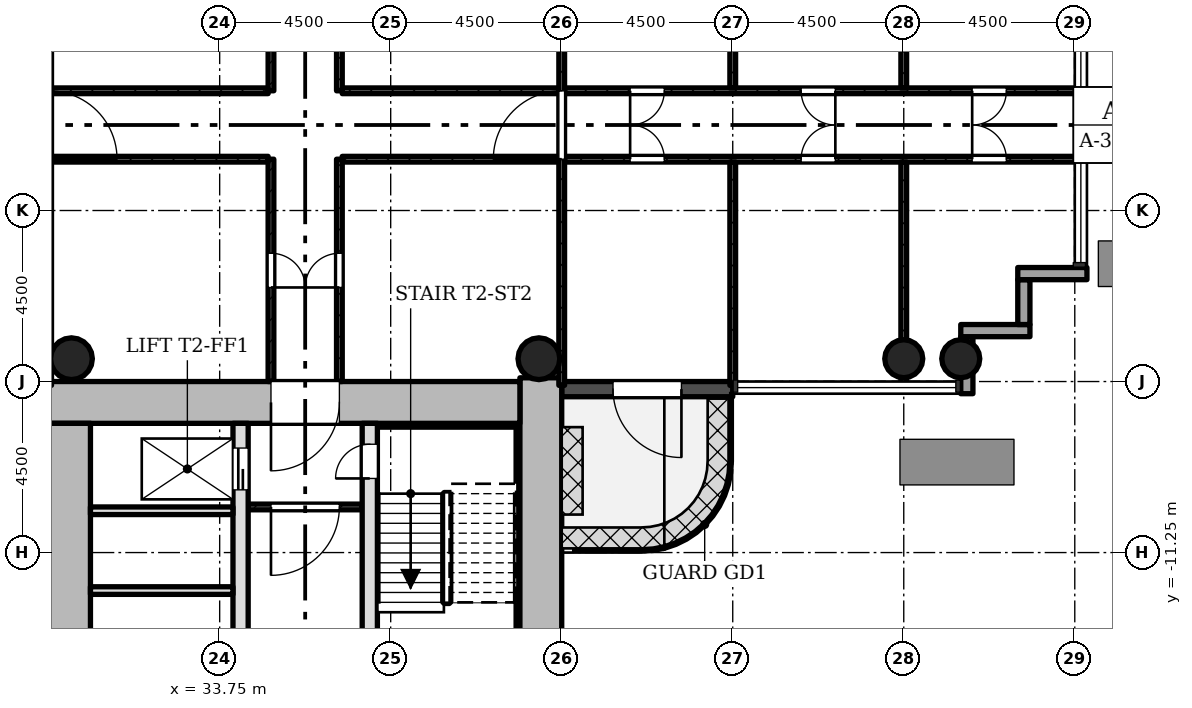
"""IFC4 building model, lengths in metres.
Left out: names, types, materials, properties, quantities, classifications, styles, units other than length and angle.
Written with IfcOpenShell. Run it as: python <this file> out.ifc"""

import sys

from ifc_helpers import new_model, si_unit, direction, frame, frame_2d, origin, origin_2d, place, context, subcontext, project, spatial, rectangle, hollow_circle, extrude, element, fill, save


model = new_model("IFC4")
c1 = context("Model", 3, precision=1e-05, world=origin(), true_north=direction((0.0, 1.0)))
c2 = subcontext(c1, "Body", "Model", "MODEL_VIEW")
j1 = project(units=[si_unit("LENGTHUNIT", "METRE"), si_unit("PLANEANGLEUNIT", "RADIAN")], contexts=[c1])
p1 = place(None, origin())
s1 = spatial("IfcSite", under=j1, at=p1, CompositionType="ELEMENT")
p2 = place(p1, origin())
s2 = spatial("IfcBuilding", under=s1, at=p2, CompositionType="ELEMENT")
p3 = place(p2, frame((0.0, 0.0, 72.1)))
s3 = spatial("IfcBuildingStorey", under=s2, at=p3, CompositionType="ELEMENT", Elevation=72.1)
p4 = place(p3, frame((42.2, -15.248, 0.0), z_axis=(0.0, 0.0, 1.0), x_axis=(0.0, 1.0, 0.0)))
e1 = element("IfcWall", 1, at=p4, inside=s3, PredefinedType="SHEAR", context=c2, shape_type="SweptSolid", body=[
    extrude(rectangle(XDim=8.596, YDim=1.1, at=frame_2d((4.298, 0.0))), origin(), (0.0, 0.0, 1.0), 4.5),
])
p5 = place(p3, frame((41.65, -7.3, 0.0), z_axis=(0.0, 0.0, 1.0), x_axis=(-1.0, 0.0, 0.0)))
e2 = element("IfcWall", 2, at=p5, inside=s3, PredefinedType="SHEAR", context=c2, shape_type="SweptSolid", body=[
    extrude(rectangle(XDim=12.4, YDim=1.1, at=frame_2d((6.2, 0.0))), origin(), (0.0, 0.0, 1.0), 4.5),
])
p6 = place(p5, frame((4.75, 0.0, 0.0)))
e3 = element("IfcOpeningElement", 3, at=p6, cuts=e2, PredefinedType="OPENING", context=c2, shape_type="SweptSolid", body=[
    extrude(rectangle(XDim=1.8, YDim=2.1, at=frame_2d((0.9, 1.05))), frame((0.0, 0.56, 0.0), z_axis=(0.0, -1.0, 0.0), x_axis=(1.0, 0.0, 0.0)), (0.0, 0.0, 1.0), 1.12),
])
p7 = place(p3, frame((29.8, -7.85, 0.0), z_axis=(0.0, 0.0, 1.0), x_axis=(0.0, -1.0, 0.0)))
e4 = element("IfcWall", 4, at=p7, inside=s3, PredefinedType="SHEAR", context=c2, shape_type="SweptSolid", body=[
    extrude(rectangle(XDim=7.9, YDim=1.1, at=frame_2d((3.95, 0.0))), origin(), (0.0, 0.0, 1.0), 4.5),
])
p8 = place(p3, frame((34.3, -14.65, 0.0), z_axis=(0.0, 0.0, 1.0), x_axis=(0.0, 1.0, 0.0)))
e5 = element("IfcWall", 5, at=p8, inside=s3, PredefinedType="SHEAR", context=c2, shape_type="SweptSolid", body=[
    extrude(rectangle(XDim=6.8, YDim=0.4, at=frame_2d((3.4, 0.0))), origin(), (0.0, 0.0, 1.0), 4.5),
])
p9 = place(p8, frame((5.05, 0.0, 0.0)))
e6 = element("IfcOpeningElement", 6, at=p9, cuts=e5, PredefinedType="OPENING", context=c2, shape_type="SweptSolid", body=[
    extrude(rectangle(XDim=1.1, YDim=2.1, at=frame_2d((0.55, 1.05))), frame((0.0, 0.21, 0.0), z_axis=(0.0, -1.0, 0.0), x_axis=(1.0, 0.0, 0.0)), (0.0, 0.0, 1.0), 0.42),
])
p10 = place(p3, frame((37.7, -14.65, 0.0), z_axis=(0.0, 0.0, 1.0), x_axis=(0.0, 1.0, 0.0)))
e7 = element("IfcWall", 7, at=p10, inside=s3, PredefinedType="SHEAR", context=c2, shape_type="SweptSolid", body=[
    extrude(rectangle(XDim=6.8, YDim=0.4, at=frame_2d((3.4, 0.0))), origin(), (0.0, 0.0, 1.0), 4.5),
])
p11 = place(p10, frame((5.35, 0.0, 0.0)))
e8 = element("IfcOpeningElement", 8, at=p11, cuts=e7, PredefinedType="OPENING", context=c2, shape_type="SweptSolid", body=[
    extrude(rectangle(XDim=0.9, YDim=2.1, at=frame_2d((0.45, 1.05))), frame((0.0, 0.21, 0.0), z_axis=(0.0, -1.0, 0.0), x_axis=(1.0, 0.0, 0.0)), (0.0, 0.0, 1.0), 0.42),
])
for number, where, z_axis, x_axis in (
    (9, (51.75, -6.15, 0.0), (0.0, 0.0, 1.0), (1.0, 0.0, 0.0)),
    (10, (53.25, -6.15, 0.0), (0.0, 0.0, 1.0), (1.0, 0.0, 0.0)),
):
    element("IfcColumn", number, at=place(p3, frame(where, z_axis=z_axis, x_axis=x_axis)), inside=s3, PredefinedType="COLUMN", context=c2, shape_type="SweptSolid", body=[
        extrude(hollow_circle(Radius=0.5, WallThickness=0.036, at=origin_2d()), origin(), (0.0, 0.0, 1.0), 4.5),
    ])
for number, where, z_axis, x_axis in (
    (11, (42.15, -6.15, 0.0), (0.0, 0.0, 1.0), (1.0, 0.0, 0.0)),
    (12, (29.85, -6.15, 0.0), (0.0, 0.0, 1.0), (1.0, 0.0, 0.0)),
):
    element("IfcColumn", number, at=place(p3, frame(where, z_axis=z_axis, x_axis=x_axis)), inside=s3, PredefinedType="COLUMN", context=c2, shape_type="SweptSolid", body=[
        extrude(hollow_circle(Radius=0.55, WallThickness=0.04, at=origin_2d()), origin(), (0.0, 0.0, 1.0), 4.5),
    ])
p12 = place(p3, frame((42.75, -6.95, -0.02), z_axis=(0.0, 0.0, 1.0), x_axis=(1.0, 0.0, 0.0)))
e13 = element("IfcWall", 13, at=p12, inside=s3, PredefinedType="STANDARD", context=c2, shape_type="SweptSolid", body=[
    extrude(rectangle(XDim=4.5, YDim=0.4, at=frame_2d((2.25, 0.0))), origin(), (0.0, 0.0, 1.0), 4.22),
])
p13 = place(p12, frame((1.35, 0.0, 0.02)))
e14 = element("IfcOpeningElement", 14, at=p13, cuts=e13, PredefinedType="OPENING", context=c2, shape_type="SweptSolid", body=[
    extrude(rectangle(XDim=1.8, YDim=2.1, at=frame_2d((0.9, 1.05))), frame((0.0, 0.21, 0.0), z_axis=(0.0, -1.0, 0.0), x_axis=(1.0, 0.0, 0.0)), (0.0, 0.0, 1.0), 0.42),
])
p14 = place(p3, frame((53.41, -7.07, -0.3), z_axis=(0.0, 0.0, 1.0), x_axis=(0.0, 1.0, 0.0)))
e15 = element("IfcWall", 15, at=p14, inside=s3, PredefinedType="STANDARD", context=c2, shape_type="SweptSolid", body=[
    extrude(rectangle(XDim=1.5, YDim=0.32, at=frame_2d((0.75, 0.0))), origin(), (0.0, 0.0, 1.0), 4.5),
])
p15 = place(p3, frame((53.25, -5.41, -0.3), z_axis=(0.0, 0.0, 1.0), x_axis=(1.0, 0.0, 0.0)))
e16 = element("IfcWall", 16, at=p15, inside=s3, PredefinedType="STANDARD", context=c2, shape_type="SweptSolid", body=[
    extrude(rectangle(XDim=1.82, YDim=0.32, at=frame_2d((0.91, 0.0))), origin(), (0.0, 0.0, 1.0), 4.5),
])
p16 = place(p3, frame((54.91, -5.25, -0.3), z_axis=(0.0, 0.0, 1.0), x_axis=(0.0, 1.0, 0.0)))
e17 = element("IfcWall", 17, at=p16, inside=s3, PredefinedType="STANDARD", context=c2, shape_type="SweptSolid", body=[
    extrude(rectangle(XDim=1.18, YDim=0.32, at=frame_2d((0.59, 0.0))), origin(), (0.0, 0.0, 1.0), 4.5),
])
p17 = place(p3, frame((54.75, -3.91, -0.3), z_axis=(0.0, 0.0, 1.0), x_axis=(1.0, 0.0, 0.0)))
e18 = element("IfcWall", 18, at=p17, inside=s3, PredefinedType="STANDARD", context=c2, shape_type="SweptSolid", body=[
    extrude(rectangle(XDim=1.82, YDim=0.32, at=frame_2d((0.91, 0.0))), origin(), (0.0, 0.0, 1.0), 4.5),
])
p18 = place(p3, frame((34.5, -10.05, 0.0), z_axis=(0.0, 0.0, 1.0), x_axis=(1.0, 0.0, 0.0)))
e19 = element("IfcWall", 19, at=p18, inside=s3, PredefinedType="PARTITIONING", context=c2, shape_type="SweptSolid", body=[
    extrude(rectangle(XDim=3.0, YDim=0.15, at=frame_2d((1.5, 0.0))), origin(), (0.0, 0.0, 1.0), 4.08),
])
p19 = place(p18, frame((0.6, 0.0, 0.0)))
e20 = element("IfcOpeningElement", 20, at=p19, cuts=e19, PredefinedType="OPENING", context=c2, shape_type="SweptSolid", body=[
    extrude(rectangle(XDim=1.8, YDim=2.1, at=frame_2d((0.9, 1.05))), frame((0.0, 0.085, 0.0), z_axis=(0.0, -1.0, 0.0), x_axis=(1.0, 0.0, 0.0)), (0.0, 0.0, 1.0), 0.17),
])
for number, where, z_axis, x_axis in (
    (21, (30.35, -10.15, 0.0), (0.0, 0.0, 1.0), (1.0, 0.0, 0.0)),
    (22, (30.35, -12.25, 0.0), (0.0, 0.0, 1.0), (1.0, 0.0, 0.0)),
):
    element("IfcWall", number, at=place(p3, frame(where, z_axis=z_axis, x_axis=x_axis)), inside=s3, PredefinedType="SOLIDWALL", context=c2, shape_type="SweptSolid", body=[
        extrude(rectangle(XDim=3.75, YDim=0.2, at=frame_2d((1.875, 0.0))), origin(), (0.0, 0.0, 1.0), 4.08),
    ])
p20 = place(p3, frame((35.1, 0.9, 0.0), z_axis=(0.0, 0.0, 1.0), x_axis=(0.0, 1.0, 0.0)))
e23 = element("IfcWall", 23, at=p20, inside=s3, PredefinedType="PARTITIONING", context=c2, shape_type="SweptSolid", body=[
    extrude(rectangle(XDim=5.85, YDim=0.15, at=frame_2d((2.925, 0.0))), origin(), (0.0, 0.0, 1.0), 4.08),
])
p21 = place(p20, frame((2.475, 0.0, 0.0)))
e24 = element("IfcOpeningElement", 24, at=p21, cuts=e23, PredefinedType="OPENING", context=c2, shape_type="SweptSolid", body=[
    extrude(rectangle(XDim=0.9, YDim=2.1, at=frame_2d((0.45, 1.05))), frame((0.0, 0.085, 0.0), z_axis=(0.0, -1.0, 0.0), x_axis=(1.0, 0.0, 0.0)), (0.0, 0.0, 1.0), 0.17),
])
p22 = place(p3, frame((35.025, 0.9, 0.0), z_axis=(0.0, 0.0, 1.0), x_axis=(-1.0, 0.0, 0.0)))
e25 = element("IfcWall", 25, at=p22, inside=s3, PredefinedType="PARTITIONING", context=c2, shape_type="SweptSolid", body=[
    extrude(rectangle(XDim=5.7, YDim=0.15, at=frame_2d((2.85, 0.0))), origin(), (0.0, 0.0, 1.0), 4.08),
])
p23 = place(p3, frame((36.9, 0.9, 0.0), z_axis=(0.0, 0.0, 1.0), x_axis=(0.0, 1.0, 0.0)))
e26 = element("IfcWall", 26, at=p23, inside=s3, PredefinedType="PARTITIONING", context=c2, shape_type="SweptSolid", body=[
    extrude(rectangle(XDim=5.85, YDim=0.15, at=frame_2d((2.925, 0.0))), origin(), (0.0, 0.0, 1.0), 4.08),
])
p24 = place(p23, frame((2.475, 0.0, 0.0)))
e27 = element("IfcOpeningElement", 27, at=p24, cuts=e26, PredefinedType="OPENING", context=c2, shape_type="SweptSolid", body=[
    extrude(rectangle(XDim=0.9, YDim=2.1, at=frame_2d((0.45, 1.05))), frame((0.0, 0.085, 0.0), z_axis=(0.0, -1.0, 0.0), x_axis=(1.0, 0.0, 0.0)), (0.0, 0.0, 1.0), 0.17),
])
p25 = place(p3, frame((42.675, 0.9, 0.0), z_axis=(0.0, 0.0, 1.0), x_axis=(-1.0, 0.0, 0.0)))
e28 = element("IfcWall", 28, at=p25, inside=s3, PredefinedType="PARTITIONING", context=c2, shape_type="SweptSolid", body=[
    extrude(rectangle(XDim=5.7, YDim=0.15, at=frame_2d((2.85, 0.0))), origin(), (0.0, 0.0, 1.0), 4.08),
])
p26 = place(p3, frame((35.1, -6.75, 0.0), z_axis=(0.0, 0.0, 1.0), x_axis=(0.0, 1.0, 0.0)))
e29 = element("IfcWall", 29, at=p26, inside=s3, PredefinedType="PARTITIONING", context=c2, shape_type="SweptSolid", body=[
    extrude(rectangle(XDim=5.85, YDim=0.15, at=frame_2d((2.925, 0.0))), origin(), (0.0, 0.0, 1.0), 4.08),
])
p27 = place(p26, frame((2.475, 0.0, 0.0)))
e30 = element("IfcOpeningElement", 30, at=p27, cuts=e29, PredefinedType="OPENING", context=c2, shape_type="SweptSolid", body=[
    extrude(rectangle(XDim=0.9, YDim=2.1, at=frame_2d((0.45, 1.05))), frame((0.0, 0.085, 0.0), z_axis=(0.0, -1.0, 0.0), x_axis=(1.0, 0.0, 0.0)), (0.0, 0.0, 1.0), 0.17),
])
p28 = place(p3, frame((35.025, -0.9, 0.0), z_axis=(0.0, 0.0, 1.0), x_axis=(-1.0, 0.0, 0.0)))
e31 = element("IfcWall", 31, at=p28, inside=s3, PredefinedType="PARTITIONING", context=c2, shape_type="SweptSolid", body=[
    extrude(rectangle(XDim=5.7, YDim=0.15, at=frame_2d((2.85, 0.0))), origin(), (0.0, 0.0, 1.0), 4.08),
])
p29 = place(p3, frame((36.9, -6.75, 0.0), z_axis=(0.0, 0.0, 1.0), x_axis=(0.0, 1.0, 0.0)))
e32 = element("IfcWall", 32, at=p29, inside=s3, PredefinedType="PARTITIONING", context=c2, shape_type="SweptSolid", body=[
    extrude(rectangle(XDim=5.85, YDim=0.15, at=frame_2d((2.925, 0.0))), origin(), (0.0, 0.0, 1.0), 4.08),
])
p30 = place(p29, frame((2.475, 0.0, 0.0)))
e33 = element("IfcOpeningElement", 33, at=p30, cuts=e32, PredefinedType="OPENING", context=c2, shape_type="SweptSolid", body=[
    extrude(rectangle(XDim=0.9, YDim=2.1, at=frame_2d((0.45, 1.05))), frame((0.0, 0.085, 0.0), z_axis=(0.0, -1.0, 0.0), x_axis=(1.0, 0.0, 0.0)), (0.0, 0.0, 1.0), 0.17),
])
p31 = place(p3, frame((42.675, -0.9, 0.0), z_axis=(0.0, 0.0, 1.0), x_axis=(-1.0, 0.0, 0.0)))
e34 = element("IfcWall", 34, at=p31, inside=s3, PredefinedType="PARTITIONING", context=c2, shape_type="SweptSolid", body=[
    extrude(rectangle(XDim=5.7, YDim=0.15, at=frame_2d((2.85, 0.0))), origin(), (0.0, 0.0, 1.0), 4.08),
])
p32 = place(p3, frame((42.75, -6.85, 0.0), z_axis=(0.0, 0.0, 1.0), x_axis=(0.0, 1.0, 0.0)))
e35 = element("IfcWall", 35, at=p32, inside=s3, PredefinedType="PARTITIONING", context=c2, shape_type="SweptSolid", body=[
    extrude(rectangle(XDim=13.7, YDim=0.15, at=frame_2d((6.85, 0.0))), origin(), (0.0, 0.0, 1.0), 4.08),
])
p33 = place(p32, frame((5.95, 0.0, 0.0)))
e36 = element("IfcOpeningElement", 36, at=p33, cuts=e35, PredefinedType="OPENING", context=c2, shape_type="SweptSolid", body=[
    extrude(rectangle(XDim=1.8, YDim=2.1, at=frame_2d((0.9, 1.05))), frame((0.0, 0.085, 0.0), z_axis=(0.0, -1.0, 0.0), x_axis=(1.0, 0.0, 0.0)), (0.0, 0.0, 1.0), 0.17),
])
p34 = place(p3, frame((56.35, 0.9, 0.0), z_axis=(0.0, 0.0, 1.0), x_axis=(-1.0, 0.0, 0.0)))
e37 = element("IfcWall", 37, at=p34, inside=s3, PredefinedType="PARTITIONING", context=c2, shape_type="SweptSolid", body=[
    extrude(rectangle(XDim=13.525, YDim=0.15, at=frame_2d((6.763, 0.0))), origin(), (0.0, 0.0, 1.0), 4.08),
])
p35 = place(p34, frame((1.9, 0.0, 0.0)))
e38 = element("IfcOpeningElement", 38, at=p35, cuts=e37, PredefinedType="OPENING", context=c2, shape_type="SweptSolid", body=[
    extrude(rectangle(XDim=0.9, YDim=2.1, at=frame_2d((0.45, 1.05))), frame((0.0, 0.085, 0.0), z_axis=(0.0, -1.0, 0.0), x_axis=(1.0, 0.0, 0.0)), (0.0, 0.0, 1.0), 0.17),
])
p36 = place(p34, frame((6.4, 0.0, 0.0)))
e39 = element("IfcOpeningElement", 39, at=p36, cuts=e37, PredefinedType="OPENING", context=c2, shape_type="SweptSolid", body=[
    extrude(rectangle(XDim=0.9, YDim=2.1, at=frame_2d((0.45, 1.05))), frame((0.0, 0.085, 0.0), z_axis=(0.0, -1.0, 0.0), x_axis=(1.0, 0.0, 0.0)), (0.0, 0.0, 1.0), 0.17),
])
p37 = place(p34, frame((10.9, 0.0, 0.0)))
e40 = element("IfcOpeningElement", 40, at=p37, cuts=e37, PredefinedType="OPENING", context=c2, shape_type="SweptSolid", body=[
    extrude(rectangle(XDim=0.9, YDim=2.1, at=frame_2d((0.45, 1.05))), frame((0.0, 0.085, 0.0), z_axis=(0.0, -1.0, 0.0), x_axis=(1.0, 0.0, 0.0)), (0.0, 0.0, 1.0), 0.17),
])
for number, where, z_axis, x_axis in (
    (41, (51.75, 0.975, 0.0), (0.0, 0.0, 1.0), (0.0, 1.0, 0.0)),
    (42, (47.25, 0.975, 0.0), (0.0, 0.0, 1.0), (0.0, 1.0, 0.0)),
):
    element("IfcWall", number, at=place(p3, frame(where, z_axis=z_axis, x_axis=x_axis)), inside=s3, PredefinedType="PARTITIONING", context=c2, shape_type="SweptSolid", body=[
        extrude(rectangle(XDim=5.875, YDim=0.15, at=frame_2d((2.938, 0.0))), origin(), (0.0, 0.0, 1.0), 4.08),
    ])
p38 = place(p3, frame((56.35, -0.9, 0.0), z_axis=(0.0, 0.0, 1.0), x_axis=(-1.0, 0.0, 0.0)))
e43 = element("IfcWall", 43, at=p38, inside=s3, PredefinedType="PARTITIONING", context=c2, shape_type="SweptSolid", body=[
    extrude(rectangle(XDim=13.525, YDim=0.15, at=frame_2d((6.763, 0.0))), origin(), (0.0, 0.0, 1.0), 4.08),
])
p39 = place(p38, frame((1.9, 0.0, 0.0)))
e44 = element("IfcOpeningElement", 44, at=p39, cuts=e43, PredefinedType="OPENING", context=c2, shape_type="SweptSolid", body=[
    extrude(rectangle(XDim=0.9, YDim=2.1, at=frame_2d((0.45, 1.05))), frame((0.0, 0.085, 0.0), z_axis=(0.0, -1.0, 0.0), x_axis=(1.0, 0.0, 0.0)), (0.0, 0.0, 1.0), 0.17),
])
p40 = place(p38, frame((6.4, 0.0, 0.0)))
e45 = element("IfcOpeningElement", 45, at=p40, cuts=e43, PredefinedType="OPENING", context=c2, shape_type="SweptSolid", body=[
    extrude(rectangle(XDim=0.9, YDim=2.1, at=frame_2d((0.45, 1.05))), frame((0.0, 0.085, 0.0), z_axis=(0.0, -1.0, 0.0), x_axis=(1.0, 0.0, 0.0)), (0.0, 0.0, 1.0), 0.17),
])
p41 = place(p38, frame((10.9, 0.0, 0.0)))
e46 = element("IfcOpeningElement", 46, at=p41, cuts=e43, PredefinedType="OPENING", context=c2, shape_type="SweptSolid", body=[
    extrude(rectangle(XDim=0.9, YDim=2.1, at=frame_2d((0.45, 1.05))), frame((0.0, 0.085, 0.0), z_axis=(0.0, -1.0, 0.0), x_axis=(1.0, 0.0, 0.0)), (0.0, 0.0, 1.0), 0.17),
])
for number, where, z_axis, x_axis in (
    (47, (51.75, -0.975, 0.0), (0.0, 0.0, 1.0), (0.0, -1.0, 0.0)),
    (48, (47.25, -0.975, 0.0), (0.0, 0.0, 1.0), (0.0, -1.0, 0.0)),
):
    element("IfcWall", number, at=place(p3, frame(where, z_axis=z_axis, x_axis=x_axis)), inside=s3, PredefinedType="PARTITIONING", context=c2, shape_type="SweptSolid", body=[
        extrude(rectangle(XDim=5.875, YDim=0.15, at=frame_2d((2.938, 0.0))), origin(), (0.0, 0.0, 1.0), 4.08),
    ])
p42 = place(p3, frame((41.6, -7.95, 0.0), z_axis=(0.0, 0.0, 1.0), x_axis=(0.0, -1.0, 0.0)))
e49 = element("IfcWall", 49, at=p42, inside=s3, PredefinedType="SHEAR", context=c2, shape_type="SweptSolid", body=[
    extrude(rectangle(XDim=6.6, YDim=0.1, at=frame_2d((3.3, 0.0))), origin(), (0.0, 0.0, 1.0), 4.5),
])
p43 = place(p3, frame((37.9, -7.9, 0.0), z_axis=(0.0, 0.0, 1.0), x_axis=(1.0, 0.0, 0.0)))
e50 = element("IfcWall", 50, at=p43, inside=s3, PredefinedType="SHEAR", context=c2, shape_type="SweptSolid", body=[
    extrude(rectangle(XDim=3.75, YDim=0.1, at=frame_2d((1.875, 0.0))), origin(), (0.0, 0.0, 1.0), 4.5),
])
p44 = place(p13, origin())
e51 = element("IfcDoor", 51, at=p44, inside=s3, OperationType="SINGLE_SWING_RIGHT", PredefinedType="DOOR", context=c2, shape_type="SweptSolid", body=[
    extrude(rectangle(XDim=1.8, YDim=2.1, at=frame_2d((0.9, 1.05))), frame((0.0, 0.025, 0.0), z_axis=(0.0, -1.0, 0.0), x_axis=(1.0, 0.0, 0.0)), (0.0, 0.0, 1.0), 0.05),
])
fill(e14, e51)
p45 = place(p19, origin())
e52 = element("IfcDoor", 52, at=p45, inside=s3, OperationType="SINGLE_SWING_LEFT", PredefinedType="DOOR", context=c2, shape_type="SweptSolid", body=[
    extrude(rectangle(XDim=1.8, YDim=2.1, at=frame_2d((0.9, 1.05))), frame((0.0, 0.025, 0.0), z_axis=(0.0, -1.0, 0.0), x_axis=(1.0, 0.0, 0.0)), (0.0, 0.0, 1.0), 0.05),
])
fill(e20, e52)
p46 = place(p27, origin())
e53 = element("IfcDoor", 53, at=p46, inside=s3, OperationType="SINGLE_SWING_LEFT", PredefinedType="DOOR", context=c2, shape_type="SweptSolid", body=[
    extrude(rectangle(XDim=0.9, YDim=2.1, at=frame_2d((0.45, 1.05))), frame((0.0, 0.025, 0.0), z_axis=(0.0, -1.0, 0.0), x_axis=(1.0, 0.0, 0.0)), (0.0, 0.0, 1.0), 0.05),
])
fill(e30, e53)
p47 = place(p30, origin())
e54 = element("IfcDoor", 54, at=p47, inside=s3, OperationType="SINGLE_SWING_RIGHT", PredefinedType="DOOR", context=c2, shape_type="SweptSolid", body=[
    extrude(rectangle(XDim=0.9, YDim=2.1, at=frame_2d((0.45, 1.05))), frame((0.0, 0.025, 0.0), z_axis=(0.0, -1.0, 0.0), x_axis=(1.0, 0.0, 0.0)), (0.0, 0.0, 1.0), 0.05),
])
fill(e33, e54)
p48 = place(p33, origin())
e55 = element("IfcDoor", 55, at=p48, inside=s3, OperationType="SINGLE_SWING_RIGHT", PredefinedType="DOOR", context=c2, shape_type="SweptSolid", body=[
    extrude(rectangle(XDim=1.8, YDim=2.1, at=frame_2d((0.9, 1.05))), frame((0.0, 0.025, 0.0), z_axis=(0.0, -1.0, 0.0), x_axis=(1.0, 0.0, 0.0)), (0.0, 0.0, 1.0), 0.05),
])
fill(e36, e55)
p49 = place(p35, origin())
e56 = element("IfcDoor", 56, at=p49, inside=s3, OperationType="SINGLE_SWING_LEFT", PredefinedType="DOOR", context=c2, shape_type="SweptSolid", body=[
    extrude(rectangle(XDim=0.9, YDim=2.1, at=frame_2d((0.45, 1.05))), frame((0.0, 0.025, 0.0), z_axis=(0.0, -1.0, 0.0), x_axis=(1.0, 0.0, 0.0)), (0.0, 0.0, 1.0), 0.05),
])
fill(e38, e56)
p50 = place(p36, origin())
e57 = element("IfcDoor", 57, at=p50, inside=s3, OperationType="SINGLE_SWING_RIGHT", PredefinedType="DOOR", context=c2, shape_type="SweptSolid", body=[
    extrude(rectangle(XDim=0.9, YDim=2.1, at=frame_2d((0.45, 1.05))), frame((0.0, 0.025, 0.0), z_axis=(0.0, -1.0, 0.0), x_axis=(1.0, 0.0, 0.0)), (0.0, 0.0, 1.0), 0.05),
])
fill(e39, e57)
p51 = place(p37, origin())
e58 = element("IfcDoor", 58, at=p51, inside=s3, OperationType="SINGLE_SWING_LEFT", PredefinedType="DOOR", context=c2, shape_type="SweptSolid", body=[
    extrude(rectangle(XDim=0.9, YDim=2.1, at=frame_2d((0.45, 1.05))), frame((0.0, 0.025, 0.0), z_axis=(0.0, -1.0, 0.0), x_axis=(1.0, 0.0, 0.0)), (0.0, 0.0, 1.0), 0.05),
])
fill(e40, e58)
p52 = place(p39, origin())
e59 = element("IfcDoor", 59, at=p52, inside=s3, OperationType="SINGLE_SWING_RIGHT", PredefinedType="DOOR", context=c2, shape_type="SweptSolid", body=[
    extrude(rectangle(XDim=0.9, YDim=2.1, at=frame_2d((0.45, 1.05))), frame((0.0, 0.025, 0.0), z_axis=(0.0, -1.0, 0.0), x_axis=(1.0, 0.0, 0.0)), (0.0, 0.0, 1.0), 0.05),
])
fill(e44, e59)
p53 = place(p40, origin())
e60 = element("IfcDoor", 60, at=p53, inside=s3, OperationType="SINGLE_SWING_LEFT", PredefinedType="DOOR", context=c2, shape_type="SweptSolid", body=[
    extrude(rectangle(XDim=0.9, YDim=2.1, at=frame_2d((0.45, 1.05))), frame((0.0, 0.025, 0.0), z_axis=(0.0, -1.0, 0.0), x_axis=(1.0, 0.0, 0.0)), (0.0, 0.0, 1.0), 0.05),
])
fill(e45, e60)
p54 = place(p41, origin())
e61 = element("IfcDoor", 61, at=p54, inside=s3, OperationType="SINGLE_SWING_RIGHT", PredefinedType="DOOR", context=c2, shape_type="SweptSolid", body=[
    extrude(rectangle(XDim=0.9, YDim=2.1, at=frame_2d((0.45, 1.05))), frame((0.0, 0.025, 0.0), z_axis=(0.0, -1.0, 0.0), x_axis=(1.0, 0.0, 0.0)), (0.0, 0.0, 1.0), 0.05),
])
fill(e46, e61)
p55 = place(p11, origin())
e62 = element("IfcDoor", 62, at=p55, inside=s3, OperationType="SINGLE_SWING_RIGHT", PredefinedType="DOOR", context=c2, shape_type="SweptSolid", body=[
    extrude(rectangle(XDim=0.9, YDim=2.1, at=frame_2d((0.45, 1.05))), frame((0.0, 0.025, 0.0), z_axis=(0.0, -1.0, 0.0), x_axis=(1.0, 0.0, 0.0)), (0.0, 0.0, 1.0), 0.05),
])
fill(e8, e62)
p56 = place(p9, origin())
e63 = element("IfcDoor", 63, at=p56, inside=s3, OperationType="SLIDING_TO_LEFT", PredefinedType="DOOR", context=c2, shape_type="SweptSolid", body=[
    extrude(rectangle(XDim=1.1, YDim=2.1, at=frame_2d((0.55, 1.05))), frame((0.0, 0.025, 0.0), z_axis=(0.0, -1.0, 0.0), x_axis=(1.0, 0.0, 0.0)), (0.0, 0.0, 1.0), 0.05),
])
fill(e6, e63)
p57 = place(p6, origin())
e64 = element("IfcDoor", 64, at=p57, inside=s3, OperationType="SINGLE_SWING_LEFT", PredefinedType="DOOR", context=c2, shape_type="SweptSolid", body=[
    extrude(rectangle(XDim=1.8, YDim=2.1, at=frame_2d((0.9, 1.05))), frame((0.0, 0.025, 0.0), z_axis=(0.0, -1.0, 0.0), x_axis=(1.0, 0.0, 0.0)), (0.0, 0.0, 1.0), 0.05),
])
fill(e3, e64)
save(model, sys.argv[1])
